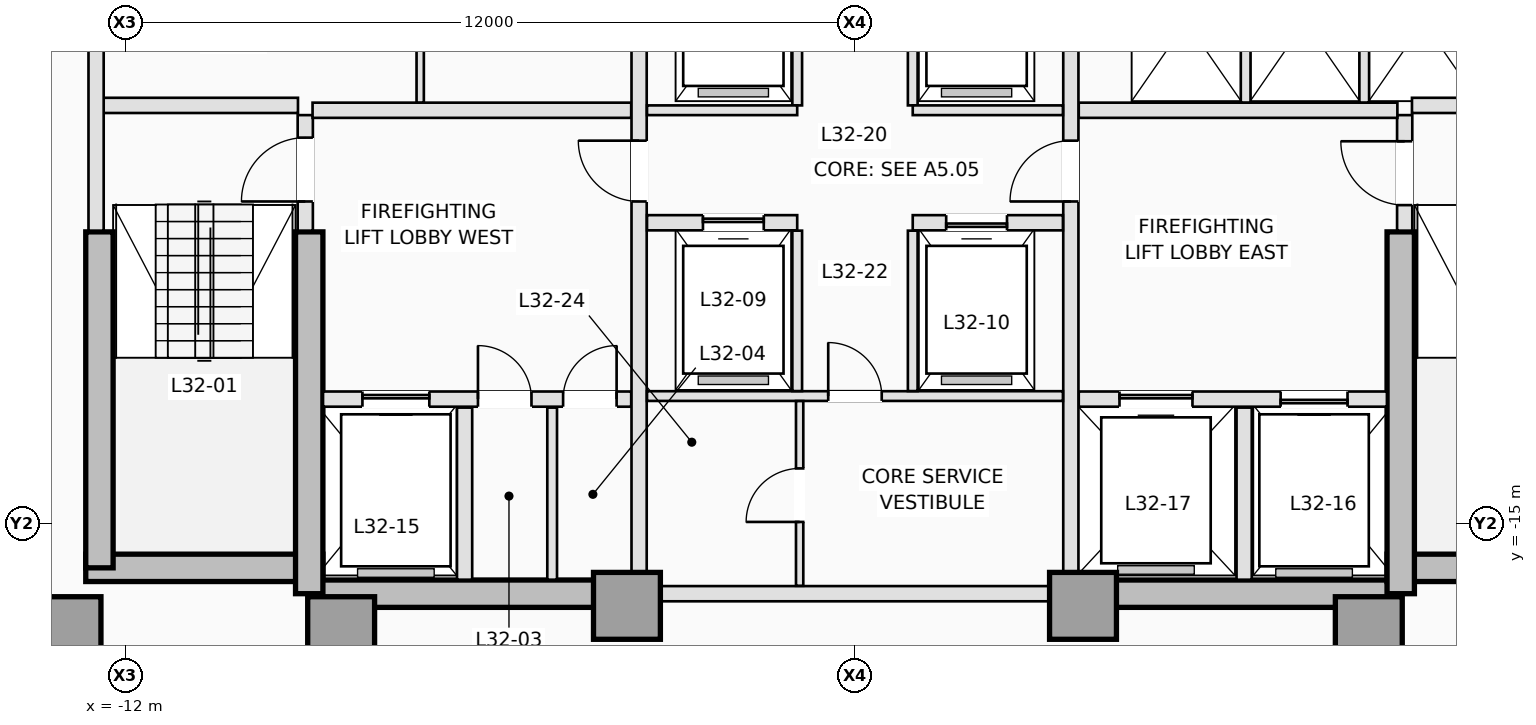
"""IFC4 building model, lengths in metres.
Left out: names, types, materials, properties, quantities, classifications, styles, units other than length and angle.
Written with IfcOpenShell. Run it as: python <this file> out.ifc"""

import sys

from ifc_helpers import new_model, si_unit, direction, frame, frame_2d, origin, origin_2d, place, context, subcontext, project, spatial, rectangle, extrude, element, fill, save


model = new_model("IFC4")
c1 = context("Model", 3, precision=1e-05, world=origin(), true_north=direction((0.0, 1.0)))
c2 = subcontext(c1, "Body", "Model", "MODEL_VIEW")
j1 = project(units=[si_unit("LENGTHUNIT", "METRE"), si_unit("PLANEANGLEUNIT", "RADIAN")], contexts=[c1])
p1 = place(None, origin())
s1 = spatial("IfcSite", under=j1, at=p1, CompositionType="ELEMENT")
p2 = place(p1, origin())
s2 = spatial("IfcBuilding", under=s1, at=p2, CompositionType="ELEMENT")
p3 = place(p2, frame((0.0, 0.0, 119.5)))
s3 = spatial("IfcBuildingStorey", under=s2, at=p3, CompositionType="ELEMENT", Elevation=119.5)
p4 = place(p3, frame((-12.65, -15.725, 0.0), z_axis=(0.0, 0.0, 1.0), x_axis=(1.0, 0.0, 0.0)))
e1 = element("IfcWall", 1, at=p4, inside=s3, PredefinedType="SHEAR", context=c2, shape_type="SweptSolid", body=[
    extrude(rectangle(XDim=3.9, YDim=0.45, at=frame_2d((1.95, 0.0))), origin(), (0.0, 0.0, 1.0), 3.5),
])
for number, where, z_axis, x_axis in (
    (2, (-8.975, -16.15, 0.0), (0.0, 0.0, 1.0), (1.0, 0.0, 0.0)),
    (3, (3.75, -16.15, 0.0), (0.0, 0.0, 1.0), (1.0, 0.0, 0.0)),
):
    element("IfcWall", number, at=place(p3, frame(where, z_axis=z_axis, x_axis=x_axis)), inside=s3, PredefinedType="SHEAR", context=c2, shape_type="SweptSolid", body=[
        extrude(rectangle(XDim=5.225, YDim=0.45, at=frame_2d((2.613, 0.0))), origin(), (0.0, 0.0, 1.0), 3.5),
    ])
p5 = place(p3, frame((8.75, -15.725, 0.0), z_axis=(0.0, 0.0, 1.0), x_axis=(1.0, 0.0, 0.0)))
e4 = element("IfcWall", 4, at=p5, inside=s3, PredefinedType="SHEAR", context=c2, shape_type="SweptSolid", body=[
    extrude(rectangle(XDim=3.9, YDim=0.45, at=frame_2d((1.95, 0.0))), origin(), (0.0, 0.0, 1.0), 3.5),
])
p6 = place(p3, frame((-12.425, -15.725, 0.0), z_axis=(0.0, 0.0, 1.0), x_axis=(0.0, 1.0, 0.0)))
e5 = element("IfcWall", 5, at=p6, inside=s3, PredefinedType="SHEAR", context=c2, shape_type="SweptSolid", body=[
    extrude(rectangle(XDim=5.525, YDim=0.45, at=frame_2d((2.763, 0.0))), origin(), (0.0, 0.0, 1.0), 3.5),
])
for number, where, z_axis, x_axis in (
    (6, (-8.975, -16.15, 0.0), (0.0, 0.0, 1.0), (0.0, 1.0, 0.0)),
    (7, (8.975, -16.15, 0.0), (0.0, 0.0, 1.0), (0.0, 1.0, 0.0)),
):
    element("IfcWall", number, at=place(p3, frame(where, z_axis=z_axis, x_axis=x_axis)), inside=s3, PredefinedType="SHEAR", context=c2, shape_type="SweptSolid", body=[
        extrude(rectangle(XDim=5.95, YDim=0.45, at=frame_2d((2.975, 0.0))), origin(), (0.0, 0.0, 1.0), 3.5),
    ])
for number, where, z_axis, x_axis in (
    (8, (-12.95, -16.75, 0.0), (0.0, 0.0, 1.0), (1.0, 0.0, 0.0)),
    (9, (-8.45, -16.75, 0.0), (0.0, 0.0, 1.0), (1.0, 0.0, 0.0)),
    (10, (-3.75, -16.35, 0.0), (0.0, 0.0, 1.0), (1.0, 0.0, 0.0)),
    (11, (3.75, -16.35, 0.0), (0.0, 0.0, 1.0), (1.0, 0.0, 0.0)),
    (12, (8.45, -16.75, 0.0), (0.0, 0.0, 1.0), (1.0, 0.0, 0.0)),
):
    element("IfcColumn", number, at=place(p3, frame(where, z_axis=z_axis, x_axis=x_axis)), inside=s3, PredefinedType="COLUMN", context=c2, shape_type="SweptSolid", body=[
        extrude(rectangle(XDim=1.1, YDim=1.1, at=origin_2d()), origin(), (0.0, 0.0, 1.0), 3.5),
    ])
p7 = place(p3, frame((-9.04, -10.18, 0.0), z_axis=(0.0, 0.0, 1.0), x_axis=(0.0, 1.0, 0.0)))
e13 = element("IfcWall", 13, at=p7, inside=s3, PredefinedType="PARTITIONING", context=c2, shape_type="SweptSolid", body=[
    extrude(rectangle(XDim=1.9, YDim=0.25, at=frame_2d((0.95, 0.0))), origin(), (0.0, 0.0, 1.0), 3.25),
])
p8 = place(p7, frame((0.48, 0.0, 0.0)))
e14 = element("IfcOpeningElement", 14, at=p8, cuts=e13, PredefinedType="OPENING", context=c2, shape_type="SweptSolid", body=[
    extrude(rectangle(XDim=1.05, YDim=2.15, at=frame_2d((0.525, 1.075))), frame((0.0, 0.135, 0.0), z_axis=(0.0, -1.0, 0.0), x_axis=(1.0, 0.0, 0.0)), (0.0, 0.0, 1.0), 0.27),
])
p9 = place(p3, frame((9.04, -10.18, 0.0), z_axis=(0.0, 0.0, 1.0), x_axis=(0.0, 1.0, 0.0)))
e15 = element("IfcWall", 15, at=p9, inside=s3, PredefinedType="PARTITIONING", context=c2, shape_type="SweptSolid", body=[
    extrude(rectangle(XDim=1.9, YDim=0.25, at=frame_2d((0.95, 0.0))), origin(), (0.0, 0.0, 1.0), 3.25),
])
p10 = place(p9, frame((0.42, 0.0, 0.0)))
e16 = element("IfcOpeningElement", 16, at=p10, cuts=e15, PredefinedType="OPENING", context=c2, shape_type="SweptSolid", body=[
    extrude(rectangle(XDim=1.05, YDim=2.15, at=frame_2d((0.525, 1.075))), frame((0.0, 0.135, 0.0), z_axis=(0.0, -1.0, 0.0), x_axis=(1.0, 0.0, 0.0)), (0.0, 0.0, 1.0), 0.27),
])
for number, where, z_axis, x_axis in (
    (17, (-12.38, -8.12, 0.0), (0.0, 0.0, 1.0), (1.0, 0.0, 0.0)),
    (18, (9.16, -8.12, 0.0), (0.0, 0.0, 1.0), (1.0, 0.0, 0.0)),
):
    element("IfcWall", number, at=place(p3, frame(where, z_axis=z_axis, x_axis=x_axis)), inside=s3, PredefinedType="PARTITIONING", context=c2, shape_type="SweptSolid", body=[
        extrude(rectangle(XDim=3.22, YDim=0.25, at=frame_2d((1.61, 0.0))), origin(), (0.0, 0.0, 1.0), 3.25),
    ])
p11 = place(p3, frame((-12.48, -10.18, 0.0), z_axis=(0.0, 0.0, 1.0), x_axis=(0.0, 1.0, 0.0)))
e19 = element("IfcWall", 19, at=p11, inside=s3, PredefinedType="PARTITIONING", context=c2, shape_type="SweptSolid", body=[
    extrude(rectangle(XDim=4.828, YDim=0.25, at=frame_2d((2.414, 0.0))), origin(), (0.0, 0.0, 1.0), 3.25),
])
p12 = place(p3, frame((-8.748, -12.95, 0.0), z_axis=(0.0, 0.0, 1.0), x_axis=(1.0, 0.0, 0.0)))
e20 = element("IfcWall", 20, at=p12, inside=s3, PredefinedType="PARTITIONING", context=c2, shape_type="SweptSolid", body=[
    extrude(rectangle(XDim=5.068, YDim=0.25, at=frame_2d((2.534, 0.0))), origin(), (0.0, 0.0, 1.0), 3.25),
])
p13 = place(p12, frame((0.648, 0.0, 0.0)))
e21 = element("IfcOpeningElement", 21, at=p13, cuts=e20, PredefinedType="OPENING", context=c2, shape_type="SweptSolid", body=[
    extrude(rectangle(XDim=1.1, YDim=2.15, at=frame_2d((0.55, 1.075))), frame((0.0, 0.135, 0.0), z_axis=(0.0, -1.0, 0.0), x_axis=(1.0, 0.0, 0.0)), (0.0, 0.0, 1.0), 0.27),
])
p14 = place(p12, frame((2.548, 0.0, 0.0)))
e22 = element("IfcOpeningElement", 22, at=p14, cuts=e20, PredefinedType="OPENING", context=c2, shape_type="SweptSolid", body=[
    extrude(rectangle(XDim=0.88, YDim=2.1, at=frame_2d((0.44, 1.05))), frame((0.0, 0.135, 0.0), z_axis=(0.0, -1.0, 0.0), x_axis=(1.0, 0.0, 0.0)), (0.0, 0.0, 1.0), 0.27),
])
p15 = place(p12, frame((3.948, 0.0, 0.0)))
e23 = element("IfcOpeningElement", 23, at=p15, cuts=e20, PredefinedType="OPENING", context=c2, shape_type="SweptSolid", body=[
    extrude(rectangle(XDim=0.88, YDim=2.1, at=frame_2d((0.44, 1.05))), frame((0.0, 0.135, 0.0), z_axis=(0.0, -1.0, 0.0), x_axis=(1.0, 0.0, 0.0)), (0.0, 0.0, 1.0), 0.27),
])
p16 = place(p3, frame((3.68, -12.95, 0.0), z_axis=(0.0, 0.0, 1.0), x_axis=(1.0, 0.0, 0.0)))
e24 = element("IfcWall", 24, at=p16, inside=s3, PredefinedType="PARTITIONING", context=c2, shape_type="SweptSolid", body=[
    extrude(rectangle(XDim=5.068, YDim=0.25, at=frame_2d((2.534, 0.0))), origin(), (0.0, 0.0, 1.0), 3.25),
])
p17 = place(p16, frame((3.32, 0.0, 0.0)))
e25 = element("IfcOpeningElement", 25, at=p17, cuts=e24, PredefinedType="OPENING", context=c2, shape_type="SweptSolid", body=[
    extrude(rectangle(XDim=1.1, YDim=2.15, at=frame_2d((0.55, 1.075))), frame((0.0, 0.135, 0.0), z_axis=(0.0, -1.0, 0.0), x_axis=(1.0, 0.0, 0.0)), (0.0, 0.0, 1.0), 0.27),
])
p18 = place(p16, frame((0.67, 0.0, 0.0)))
e26 = element("IfcOpeningElement", 26, at=p18, cuts=e24, PredefinedType="OPENING", context=c2, shape_type="SweptSolid", body=[
    extrude(rectangle(XDim=1.2, YDim=2.15, at=frame_2d((0.6, 1.075))), frame((0.0, 0.135, 0.0), z_axis=(0.0, -1.0, 0.0), x_axis=(1.0, 0.0, 0.0)), (0.0, 0.0, 1.0), 0.27),
])
p19 = place(p3, frame((-6.42, -15.92, 0.0), z_axis=(0.0, 0.0, 1.0), x_axis=(0.0, 1.0, 0.0)))
e27 = element("IfcWall", 27, at=p19, inside=s3, PredefinedType="PARTITIONING", context=c2, shape_type="SweptSolid", body=[
    extrude(rectangle(XDim=2.83, YDim=0.25, at=frame_2d((1.415, 0.0))), origin(), (0.0, 0.0, 1.0), 3.25),
])
p20 = place(p3, frame((-4.98, -15.92, 0.0), z_axis=(0.0, 0.0, 1.0), x_axis=(0.0, 1.0, 0.0)))
e28 = element("IfcWall", 28, at=p20, inside=s3, PredefinedType="PARTITIONING", context=c2, shape_type="SweptSolid", body=[
    extrude(rectangle(XDim=2.83, YDim=0.16, at=frame_2d((1.415, 0.0))), origin(), (0.0, 0.0, 1.0), 3.25),
])
p21 = place(p3, frame((6.4, -15.92, 0.0), z_axis=(0.0, 0.0, 1.0), x_axis=(0.0, 1.0, 0.0)))
e29 = element("IfcWall", 29, at=p21, inside=s3, PredefinedType="PARTITIONING", context=c2, shape_type="SweptSolid", body=[
    extrude(rectangle(XDim=2.83, YDim=0.25, at=frame_2d((1.415, 0.0))), origin(), (0.0, 0.0, 1.0), 3.25),
])
for number, where, z_axis, x_axis in (
    (30, (-8.92, -8.2, 0.0), (0.0, 0.0, 1.0), (1.0, 0.0, 0.0)),
    (31, (3.68, -8.2, 0.0), (0.0, 0.0, 1.0), (1.0, 0.0, 0.0)),
):
    element("IfcWall", number, at=place(p3, frame(where, z_axis=z_axis, x_axis=x_axis)), inside=s3, PredefinedType="PARTITIONING", context=c2, shape_type="SweptSolid", body=[
        extrude(rectangle(XDim=5.24, YDim=0.25, at=frame_2d((2.62, 0.0))), origin(), (0.0, 0.0, 1.0), 3.25),
    ])
p22 = place(p3, frame((-3.55, -15.798, 0.0), z_axis=(0.0, 0.0, 1.0), x_axis=(0.0, 1.0, 0.0)))
e32 = element("IfcWall", 32, at=p22, inside=s3, PredefinedType="PARTITIONING", context=c2, shape_type="SweptSolid", body=[
    extrude(rectangle(XDim=10.446, YDim=0.25, at=frame_2d((5.223, 0.0))), origin(), (0.0, 0.0, 1.0), 3.25),
])
p23 = place(p22, frame((6.098, 0.0, 0.0)))
e33 = element("IfcOpeningElement", 33, at=p23, cuts=e32, PredefinedType="OPENING", context=c2, shape_type="SweptSolid", body=[
    extrude(rectangle(XDim=1.0, YDim=2.15, at=frame_2d((0.5, 1.075))), frame((0.0, 0.135, 0.0), z_axis=(0.0, -1.0, 0.0), x_axis=(1.0, 0.0, 0.0)), (0.0, 0.0, 1.0), 0.27),
])
p24 = place(p3, frame((3.55, -15.798, 0.0), z_axis=(0.0, 0.0, 1.0), x_axis=(0.0, 1.0, 0.0)))
e34 = element("IfcWall", 34, at=p24, inside=s3, PredefinedType="PARTITIONING", context=c2, shape_type="SweptSolid", body=[
    extrude(rectangle(XDim=10.446, YDim=0.25, at=frame_2d((5.223, 0.0))), origin(), (0.0, 0.0, 1.0), 3.25),
])
p25 = place(p24, frame((6.098, 0.0, 0.0)))
e35 = element("IfcOpeningElement", 35, at=p25, cuts=e34, PredefinedType="OPENING", context=c2, shape_type="SweptSolid", body=[
    extrude(rectangle(XDim=1.0, YDim=2.15, at=frame_2d((0.5, 1.075))), frame((0.0, 0.135, 0.0), z_axis=(0.0, -1.0, 0.0), x_axis=(1.0, 0.0, 0.0)), (0.0, 0.0, 1.0), 0.27),
])
p26 = place(p3, frame((-7.15, -8.073, 0.0), z_axis=(0.0, 0.0, 1.0), x_axis=(0.0, 1.0, 0.0)))
e36 = element("IfcWall", 36, at=p26, inside=s3, PredefinedType="PARTITIONING", context=c2, shape_type="SweptSolid", body=[
    extrude(rectangle(XDim=2.733, YDim=0.12, at=frame_2d((1.366, 0.0))), origin(), (0.0, 0.0, 1.0), 3.25),
])
for number, where, z_axis, x_axis in (
    (37, (6.425, -8.073, 0.0), (0.0, 0.0, 1.0), (0.0, 1.0, 0.0)),
    (38, (8.375, -8.073, 0.0), (0.0, 0.0, 1.0), (0.0, 1.0, 0.0)),
):
    element("IfcWall", number, at=place(p3, frame(where, z_axis=z_axis, x_axis=x_axis)), inside=s3, PredefinedType="PARTITIONING", context=c2, shape_type="SweptSolid", body=[
        extrude(rectangle(XDim=2.733, YDim=0.16, at=frame_2d((1.366, 0.0))), origin(), (0.0, 0.0, 1.0), 3.25),
    ])
p27 = place(p3, frame((-3.198, -16.15, 0.0), z_axis=(0.0, 0.0, 1.0), x_axis=(1.0, 0.0, 0.0)))
e39 = element("IfcWall", 39, at=p27, inside=s3, PredefinedType="PARTITIONING", context=c2, shape_type="SweptSolid", body=[
    extrude(rectangle(XDim=6.396, YDim=0.25, at=frame_2d((3.198, 0.0))), origin(), (0.0, 0.0, 1.0), 2.3),
])
for number, where, z_axis, x_axis in (
    (40, (-0.95, -8.12, 0.0), (0.0, 0.0, 1.0), (0.0, 1.0, 0.0)),
    (41, (0.95, -8.12, 0.0), (0.0, 0.0, 1.0), (0.0, 1.0, 0.0)),
):
    element("IfcWall", number, at=place(p3, frame(where, z_axis=z_axis, x_axis=x_axis)), inside=s3, PredefinedType="PARTITIONING", context=c2, shape_type="SweptSolid", body=[
        extrude(rectangle(XDim=2.78, YDim=0.16, at=frame_2d((1.39, 0.0))), origin(), (0.0, 0.0, 1.0), 3.25),
    ])
for number, where, z_axis, x_axis in (
    (42, (-3.42, -8.2, 0.0), (0.0, 0.0, 1.0), (1.0, 0.0, 0.0)),
    (43, (0.95, -8.2, 0.0), (0.0, 0.0, 1.0), (1.0, 0.0, 0.0)),
):
    element("IfcWall", number, at=place(p3, frame(where, z_axis=z_axis, x_axis=x_axis)), inside=s3, PredefinedType="PARTITIONING", context=c2, shape_type="SweptSolid", body=[
        extrude(rectangle(XDim=2.47, YDim=0.16, at=frame_2d((1.235, 0.0))), origin(), (0.0, 0.0, 1.0), 3.25),
    ])
p28 = place(p3, frame((-3.42, -10.05, 0.0), z_axis=(0.0, 0.0, 1.0), x_axis=(1.0, 0.0, 0.0)))
e44 = element("IfcWall", 44, at=p28, inside=s3, PredefinedType="PARTITIONING", context=c2, shape_type="SweptSolid", body=[
    extrude(rectangle(XDim=2.47, YDim=0.25, at=frame_2d((1.235, 0.0))), origin(), (0.0, 0.0, 1.0), 3.25),
])
p29 = place(p28, frame((0.92, 0.0, 0.0)))
e45 = element("IfcOpeningElement", 45, at=p29, cuts=e44, PredefinedType="OPENING", context=c2, shape_type="SweptSolid", body=[
    extrude(rectangle(XDim=1.0, YDim=2.15, at=frame_2d((0.5, 1.075))), frame((0.0, 0.135, 0.0), z_axis=(0.0, -1.0, 0.0), x_axis=(1.0, 0.0, 0.0)), (0.0, 0.0, 1.0), 0.27),
])
p30 = place(p3, frame((0.95, -10.05, 0.0), z_axis=(0.0, 0.0, 1.0), x_axis=(1.0, 0.0, 0.0)))
e46 = element("IfcWall", 46, at=p30, inside=s3, PredefinedType="PARTITIONING", context=c2, shape_type="SweptSolid", body=[
    extrude(rectangle(XDim=2.47, YDim=0.25, at=frame_2d((1.235, 0.0))), origin(), (0.0, 0.0, 1.0), 3.25),
])
p31 = place(p30, frame((0.55, 0.0, 0.0)))
e47 = element("IfcOpeningElement", 47, at=p31, cuts=e46, PredefinedType="OPENING", context=c2, shape_type="SweptSolid", body=[
    extrude(rectangle(XDim=1.0, YDim=2.15, at=frame_2d((0.5, 1.075))), frame((0.0, 0.135, 0.0), z_axis=(0.0, -1.0, 0.0), x_axis=(1.0, 0.0, 0.0)), (0.0, 0.0, 1.0), 0.27),
])
p32 = place(p3, frame((-3.42, -12.9, 0.0), z_axis=(0.0, 0.0, 1.0), x_axis=(1.0, 0.0, 0.0)))
e48 = element("IfcWall", 48, at=p32, inside=s3, PredefinedType="PARTITIONING", context=c2, shape_type="SweptSolid", body=[
    extrude(rectangle(XDim=6.84, YDim=0.16, at=frame_2d((3.42, 0.0))), origin(), (0.0, 0.0, 1.0), 3.25),
])
p33 = place(p32, frame((2.98, 0.0, 0.0)))
e49 = element("IfcOpeningElement", 49, at=p33, cuts=e48, PredefinedType="OPENING", context=c2, shape_type="SweptSolid", body=[
    extrude(rectangle(XDim=0.88, YDim=2.12, at=frame_2d((0.44, 1.06))), frame((0.0, 0.09, 0.0), z_axis=(0.0, -1.0, 0.0), x_axis=(1.0, 0.0, 0.0)), (0.0, 0.0, 1.0), 0.18),
])
for number, where, z_axis, x_axis in (
    (50, (-0.95, -12.818, 0.0), (0.0, 0.0, 1.0), (0.0, 1.0, 0.0)),
    (51, (0.95, -12.818, 0.0), (0.0, 0.0, 1.0), (0.0, 1.0, 0.0)),
):
    element("IfcWall", number, at=place(p3, frame(where, z_axis=z_axis, x_axis=x_axis)), inside=s3, PredefinedType="PARTITIONING", context=c2, shape_type="SweptSolid", body=[
        extrude(rectangle(XDim=2.638, YDim=0.16, at=frame_2d((1.319, 0.0))), origin(), (0.0, 0.0, 1.0), 3.25),
    ])
p34 = place(p3, frame((-0.91, -16.02, 0.0), z_axis=(0.0, 0.0, 1.0), x_axis=(0.0, 1.0, 0.0)))
e52 = element("IfcWall", 52, at=p34, inside=s3, PredefinedType="PARTITIONING", context=c2, shape_type="SweptSolid", body=[
    extrude(rectangle(XDim=3.038, YDim=0.12, at=frame_2d((1.519, 0.0))), origin(), (0.0, 0.0, 1.0), 3.25),
])
p35 = place(p34, frame((1.05, 0.0, 0.0)))
e53 = element("IfcOpeningElement", 53, at=p35, cuts=e52, PredefinedType="OPENING", context=c2, shape_type="SweptSolid", body=[
    extrude(rectangle(XDim=0.88, YDim=2.12, at=frame_2d((0.44, 1.06))), frame((0.0, 0.07, 0.0), z_axis=(0.0, -1.0, 0.0), x_axis=(1.0, 0.0, 0.0)), (0.0, 0.0, 1.0), 0.14),
])
p36 = place(p13, origin())
e54 = element("IfcDoor", 54, at=p36, inside=s3, OperationType="SLIDING_TO_LEFT", PredefinedType="DOOR", context=c2, shape_type="SweptSolid", body=[
    extrude(rectangle(XDim=1.1, YDim=2.15, at=frame_2d((0.55, 1.075))), frame((0.0, 0.025, 0.0), z_axis=(0.0, -1.0, 0.0), x_axis=(1.0, 0.0, 0.0)), (0.0, 0.0, 1.0), 0.05),
])
fill(e21, e54)
p37 = place(p17, origin())
e55 = element("IfcDoor", 55, at=p37, inside=s3, OperationType="SLIDING_TO_RIGHT", PredefinedType="DOOR", context=c2, shape_type="SweptSolid", body=[
    extrude(rectangle(XDim=1.1, YDim=2.15, at=frame_2d((0.55, 1.075))), frame((0.0, 0.025, 0.0), z_axis=(0.0, -1.0, 0.0), x_axis=(1.0, 0.0, 0.0)), (0.0, 0.0, 1.0), 0.05),
])
fill(e25, e55)
p38 = place(p18, origin())
e56 = element("IfcDoor", 56, at=p38, inside=s3, OperationType="SLIDING_TO_LEFT", PredefinedType="DOOR", context=c2, shape_type="SweptSolid", body=[
    extrude(rectangle(XDim=1.2, YDim=2.15, at=frame_2d((0.6, 1.075))), frame((0.0, 0.025, 0.0), z_axis=(0.0, -1.0, 0.0), x_axis=(1.0, 0.0, 0.0)), (0.0, 0.0, 1.0), 0.05),
])
fill(e26, e56)
p39 = place(p29, origin())
e57 = element("IfcDoor", 57, at=p39, inside=s3, OperationType="SLIDING_TO_LEFT", PredefinedType="DOOR", context=c2, shape_type="SweptSolid", body=[
    extrude(rectangle(XDim=1.0, YDim=2.15, at=frame_2d((0.5, 1.075))), frame((0.0, 0.025, 0.0), z_axis=(0.0, -1.0, 0.0), x_axis=(1.0, 0.0, 0.0)), (0.0, 0.0, 1.0), 0.05),
])
fill(e45, e57)
p40 = place(p31, origin())
e58 = element("IfcDoor", 58, at=p40, inside=s3, OperationType="SLIDING_TO_RIGHT", PredefinedType="DOOR", context=c2, shape_type="SweptSolid", body=[
    extrude(rectangle(XDim=1.0, YDim=2.15, at=frame_2d((0.5, 1.075))), frame((0.0, 0.025, 0.0), z_axis=(0.0, -1.0, 0.0), x_axis=(1.0, 0.0, 0.0)), (0.0, 0.0, 1.0), 0.05),
])
fill(e47, e58)
p41 = place(p8, origin())
e59 = element("IfcDoor", 59, at=p41, inside=s3, OperationType="SINGLE_SWING_LEFT", PredefinedType="DOOR", context=c2, shape_type="SweptSolid", body=[
    extrude(rectangle(XDim=1.05, YDim=2.15, at=frame_2d((0.525, 1.075))), frame((0.0, 0.025, 0.0), z_axis=(0.0, -1.0, 0.0), x_axis=(1.0, 0.0, 0.0)), (0.0, 0.0, 1.0), 0.05),
])
fill(e14, e59)
p42 = place(p10, origin())
e60 = element("IfcDoor", 60, at=p42, inside=s3, OperationType="SINGLE_SWING_RIGHT", PredefinedType="DOOR", context=c2, shape_type="SweptSolid", body=[
    extrude(rectangle(XDim=1.05, YDim=2.15, at=frame_2d((0.525, 1.075))), frame((0.0, 0.025, 0.0), z_axis=(0.0, -1.0, 0.0), x_axis=(1.0, 0.0, 0.0)), (0.0, 0.0, 1.0), 0.05),
])
fill(e16, e60)
p43 = place(p14, origin())
e61 = element("IfcDoor", 61, at=p43, inside=s3, OperationType="SINGLE_SWING_LEFT", PredefinedType="TRAPDOOR", context=c2, shape_type="SweptSolid", body=[
    extrude(rectangle(XDim=0.88, YDim=2.1, at=frame_2d((0.44, 1.05))), frame((0.0, 0.025, 0.0), z_axis=(0.0, -1.0, 0.0), x_axis=(1.0, 0.0, 0.0)), (0.0, 0.0, 1.0), 0.05),
])
fill(e22, e61)
p44 = place(p15, origin())
e62 = element("IfcDoor", 62, at=p44, inside=s3, OperationType="SINGLE_SWING_RIGHT", PredefinedType="TRAPDOOR", context=c2, shape_type="SweptSolid", body=[
    extrude(rectangle(XDim=0.88, YDim=2.1, at=frame_2d((0.44, 1.05))), frame((0.0, 0.025, 0.0), z_axis=(0.0, -1.0, 0.0), x_axis=(1.0, 0.0, 0.0)), (0.0, 0.0, 1.0), 0.05),
])
fill(e23, e62)
p45 = place(p23, origin())
e63 = element("IfcDoor", 63, at=p45, inside=s3, OperationType="SINGLE_SWING_RIGHT", PredefinedType="DOOR", context=c2, shape_type="SweptSolid", body=[
    extrude(rectangle(XDim=1.0, YDim=2.15, at=frame_2d((0.5, 1.075))), frame((0.0, 0.025, 0.0), z_axis=(0.0, -1.0, 0.0), x_axis=(1.0, 0.0, 0.0)), (0.0, 0.0, 1.0), 0.05),
])
fill(e33, e63)
p46 = place(p25, origin())
e64 = element("IfcDoor", 64, at=p46, inside=s3, OperationType="SINGLE_SWING_LEFT", PredefinedType="DOOR", context=c2, shape_type="SweptSolid", body=[
    extrude(rectangle(XDim=1.0, YDim=2.15, at=frame_2d((0.5, 1.075))), frame((0.0, 0.025, 0.0), z_axis=(0.0, -1.0, 0.0), x_axis=(1.0, 0.0, 0.0)), (0.0, 0.0, 1.0), 0.05),
])
fill(e35, e64)
p47 = place(p33, origin())
e65 = element("IfcDoor", 65, at=p47, inside=s3, OperationType="SINGLE_SWING_LEFT", PredefinedType="DOOR", context=c2, shape_type="SweptSolid", body=[
    extrude(rectangle(XDim=0.88, YDim=2.12, at=frame_2d((0.44, 1.06))), frame((0.0, 0.025, 0.0), z_axis=(0.0, -1.0, 0.0), x_axis=(1.0, 0.0, 0.0)), (0.0, 0.0, 1.0), 0.05),
])
fill(e49, e65)
p48 = place(p35, origin())
e66 = element("IfcDoor", 66, at=p48, inside=s3, OperationType="SINGLE_SWING_LEFT", PredefinedType="DOOR", context=c2, shape_type="SweptSolid", body=[
    extrude(rectangle(XDim=0.88, YDim=2.12, at=frame_2d((0.44, 1.06))), frame((0.0, 0.025, 0.0), z_axis=(0.0, -1.0, 0.0), x_axis=(1.0, 0.0, 0.0)), (0.0, 0.0, 1.0), 0.05),
])
fill(e53, e66)
save(model, sys.argv[1])
